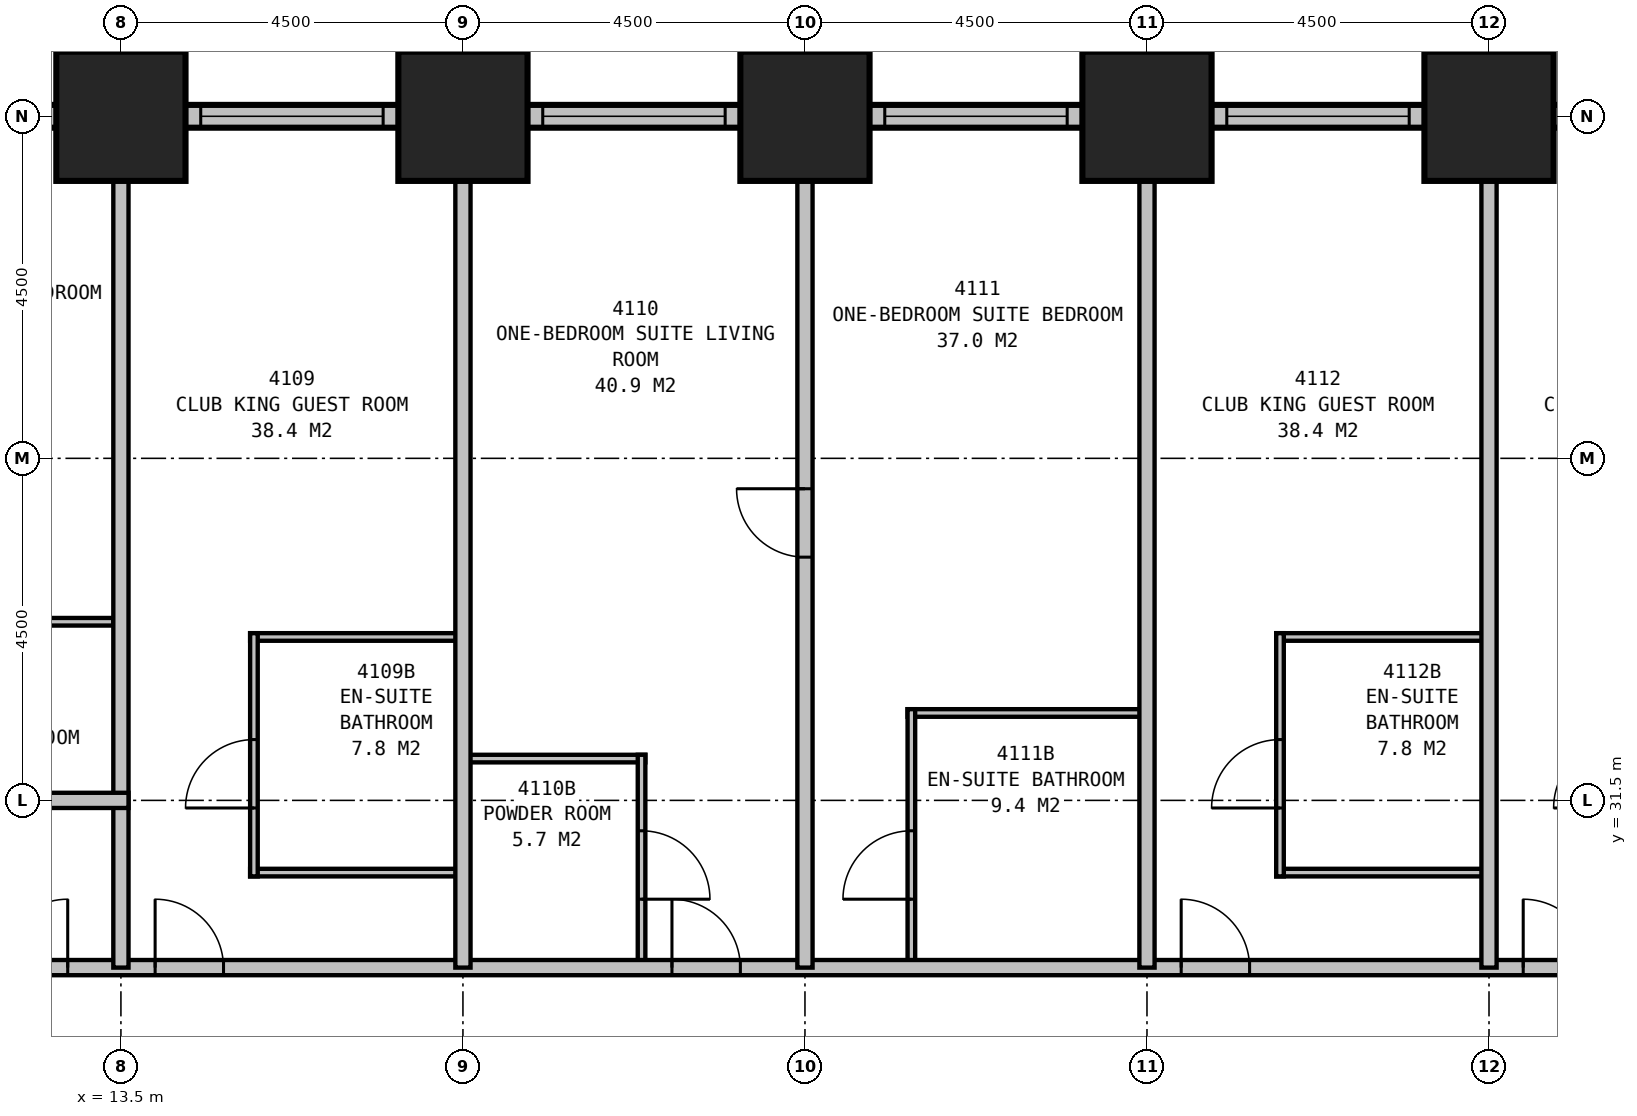
"""IFC4 building model, lengths in metres.
Left out: names, types, materials, properties, quantities, classifications, styles, units other than length and angle.
Written with IfcOpenShell. Run it as: python <this file> out.ifc"""

import sys

from ifc_helpers import new_model, si_unit, direction, frame, frame_2d, origin, origin_2d, place, context, subcontext, project, spatial, rectangle, extrude, element, fill, save


model = new_model("IFC4")
c1 = context("Model", 3, precision=1e-05, world=origin(), true_north=direction((0.0, 1.0)))
c2 = subcontext(c1, "Body", "Model", "MODEL_VIEW")
j1 = project(units=[si_unit("LENGTHUNIT", "METRE"), si_unit("PLANEANGLEUNIT", "RADIAN")], contexts=[c1])
p1 = place(None, origin())
s1 = spatial("IfcSite", under=j1, at=p1, CompositionType="ELEMENT")
p2 = place(p1, origin())
s2 = spatial("IfcBuilding", under=s1, at=p2, CompositionType="ELEMENT")
p3 = place(p2, frame((0.0, 0.0, 162.4)))
s3 = spatial("IfcBuildingStorey", under=s2, at=p3, CompositionType="ELEMENT", Elevation=162.4)
for number, where, z_axis, x_axis in (
    (1, (31.5, 40.5, 0.0), (0.0, 0.0, 1.0), (1.0, 0.0, 0.0)),
    (2, (27.0, 40.5, 0.0), (0.0, 0.0, 1.0), (1.0, 0.0, 0.0)),
    (3, (22.5, 40.5, 0.0), (0.0, 0.0, 1.0), (1.0, 0.0, 0.0)),
    (4, (18.0, 40.5, 0.0), (0.0, 0.0, 1.0), (1.0, 0.0, 0.0)),
    (5, (13.5, 40.5, 0.0), (0.0, 0.0, 1.0), (1.0, 0.0, 0.0)),
):
    element("IfcColumn", number, at=place(p3, frame(where, z_axis=z_axis, x_axis=x_axis)), inside=s3, PredefinedType="COLUMN", context=c2, shape_type="SweptSolid", body=[
        extrude(rectangle(XDim=1.7, YDim=1.7, at=origin_2d()), origin(), (0.0, 0.0, 1.0), 3.5),
    ])
p4 = place(p3, frame((40.65, 40.5, 0.0), z_axis=(0.0, 0.0, 1.0), x_axis=(-1.0, 0.0, 0.0)))
e6 = element("IfcWall", 6, at=p4, inside=s3, PredefinedType="STANDARD", context=c2, shape_type="SweptSolid", body=[
    extrude(rectangle(XDim=31.8, YDim=0.3, at=frame_2d((15.9, 0.0))), origin(), (0.0, 0.0, 1.0), 2.25),
])
p5 = place(p4, frame((1.2, 0.0, 0.5)))
e7 = element("IfcOpeningElement", 7, at=p5, cuts=e6, PredefinedType="OPENING", context=c2, shape_type="SweptSolid", body=[
    extrude(rectangle(XDim=2.4, YDim=1.6, at=frame_2d((1.2, 0.8))), frame((0.0, 0.16, 0.0), z_axis=(0.0, -1.0, 0.0), x_axis=(1.0, 0.0, 0.0)), (0.0, 0.0, 1.0), 0.32),
])
p6 = place(p4, frame((5.7, 0.0, 0.5)))
e8 = element("IfcOpeningElement", 8, at=p6, cuts=e6, PredefinedType="OPENING", context=c2, shape_type="SweptSolid", body=[
    extrude(rectangle(XDim=2.4, YDim=1.6, at=frame_2d((1.2, 0.8))), frame((0.0, 0.16, 0.0), z_axis=(0.0, -1.0, 0.0), x_axis=(1.0, 0.0, 0.0)), (0.0, 0.0, 1.0), 0.32),
])
p7 = place(p4, frame((10.2, 0.0, 0.5)))
e9 = element("IfcOpeningElement", 9, at=p7, cuts=e6, PredefinedType="OPENING", context=c2, shape_type="SweptSolid", body=[
    extrude(rectangle(XDim=2.4, YDim=1.6, at=frame_2d((1.2, 0.8))), frame((0.0, 0.16, 0.0), z_axis=(0.0, -1.0, 0.0), x_axis=(1.0, 0.0, 0.0)), (0.0, 0.0, 1.0), 0.32),
])
p8 = place(p4, frame((14.7, 0.0, 0.5)))
e10 = element("IfcOpeningElement", 10, at=p8, cuts=e6, PredefinedType="OPENING", context=c2, shape_type="SweptSolid", body=[
    extrude(rectangle(XDim=2.4, YDim=1.6, at=frame_2d((1.2, 0.8))), frame((0.0, 0.16, 0.0), z_axis=(0.0, -1.0, 0.0), x_axis=(1.0, 0.0, 0.0)), (0.0, 0.0, 1.0), 0.32),
])
p9 = place(p4, frame((19.2, 0.0, 0.5)))
e11 = element("IfcOpeningElement", 11, at=p9, cuts=e6, PredefinedType="OPENING", context=c2, shape_type="SweptSolid", body=[
    extrude(rectangle(XDim=2.4, YDim=1.6, at=frame_2d((1.2, 0.8))), frame((0.0, 0.16, 0.0), z_axis=(0.0, -1.0, 0.0), x_axis=(1.0, 0.0, 0.0)), (0.0, 0.0, 1.0), 0.32),
])
p10 = place(p4, frame((23.7, 0.0, 0.5)))
e12 = element("IfcOpeningElement", 12, at=p10, cuts=e6, PredefinedType="OPENING", context=c2, shape_type="SweptSolid", body=[
    extrude(rectangle(XDim=2.4, YDim=1.6, at=frame_2d((1.2, 0.8))), frame((0.0, 0.16, 0.0), z_axis=(0.0, -1.0, 0.0), x_axis=(1.0, 0.0, 0.0)), (0.0, 0.0, 1.0), 0.32),
])
p11 = place(p4, frame((28.2, 0.0, 0.5)))
e13 = element("IfcOpeningElement", 13, at=p11, cuts=e6, PredefinedType="OPENING", context=c2, shape_type="SweptSolid", body=[
    extrude(rectangle(XDim=2.4, YDim=1.6, at=frame_2d((1.2, 0.8))), frame((0.0, 0.16, 0.0), z_axis=(0.0, -1.0, 0.0), x_axis=(1.0, 0.0, 0.0)), (0.0, 0.0, 1.0), 0.32),
])
p12 = place(p3, frame((11.2, 29.3, 0.0), z_axis=(0.0, 0.0, 1.0), x_axis=(1.0, 0.0, 0.0)))
e14 = element("IfcWall", 14, at=p12, inside=s3, PredefinedType="PARTITIONING", context=c2, shape_type="SweptSolid", body=[
    extrude(rectangle(XDim=27.1, YDim=0.2, at=frame_2d((13.55, 0.0))), origin(), (0.0, 0.0, 1.0), 3.25),
])
p13 = place(p12, frame((2.75, 0.0, 0.0)))
e15 = element("IfcOpeningElement", 15, at=p13, cuts=e14, PredefinedType="OPENING", context=c2, shape_type="SweptSolid", body=[
    extrude(rectangle(XDim=0.9, YDim=2.1, at=frame_2d((0.45, 1.05))), frame((0.0, 0.11, 0.0), z_axis=(0.0, -1.0, 0.0), x_axis=(1.0, 0.0, 0.0)), (0.0, 0.0, 1.0), 0.22),
])
p14 = place(p12, frame((9.55, 0.0, 0.0)))
e16 = element("IfcOpeningElement", 16, at=p14, cuts=e14, PredefinedType="OPENING", context=c2, shape_type="SweptSolid", body=[
    extrude(rectangle(XDim=0.9, YDim=2.1, at=frame_2d((0.45, 1.05))), frame((0.0, 0.11, 0.0), z_axis=(0.0, -1.0, 0.0), x_axis=(1.0, 0.0, 0.0)), (0.0, 0.0, 1.0), 0.22),
])
p15 = place(p12, frame((16.25, 0.0, 0.0)))
e17 = element("IfcOpeningElement", 17, at=p15, cuts=e14, PredefinedType="OPENING", context=c2, shape_type="SweptSolid", body=[
    extrude(rectangle(XDim=0.9, YDim=2.1, at=frame_2d((0.45, 1.05))), frame((0.0, 0.11, 0.0), z_axis=(0.0, -1.0, 0.0), x_axis=(1.0, 0.0, 0.0)), (0.0, 0.0, 1.0), 0.22),
])
p16 = place(p12, frame((20.75, 0.0, 0.0)))
e18 = element("IfcOpeningElement", 18, at=p16, cuts=e14, PredefinedType="OPENING", context=c2, shape_type="SweptSolid", body=[
    extrude(rectangle(XDim=0.9, YDim=2.1, at=frame_2d((0.45, 1.05))), frame((0.0, 0.11, 0.0), z_axis=(0.0, -1.0, 0.0), x_axis=(1.0, 0.0, 0.0)), (0.0, 0.0, 1.0), 0.22),
])
p17 = place(p12, frame((25.5, 0.0, 0.0)))
e19 = element("IfcOpeningElement", 19, at=p17, cuts=e14, PredefinedType="OPENING", context=c2, shape_type="SweptSolid", body=[
    extrude(rectangle(XDim=0.9, YDim=2.1, at=frame_2d((0.45, 1.05))), frame((0.0, 0.11, 0.0), z_axis=(0.0, -1.0, 0.0), x_axis=(1.0, 0.0, 0.0)), (0.0, 0.0, 1.0), 0.22),
])
p18 = place(p12, frame((0.7, 0.0, 0.0)))
e20 = element("IfcOpeningElement", 20, at=p18, cuts=e14, PredefinedType="OPENING", context=c2, shape_type="SweptSolid", body=[
    extrude(rectangle(XDim=0.9, YDim=2.1, at=frame_2d((0.45, 1.05))), frame((0.0, 0.11, 0.0), z_axis=(0.0, -1.0, 0.0), x_axis=(1.0, 0.0, 0.0)), (0.0, 0.0, 1.0), 0.22),
])
p19 = place(p3, frame((18.0, 29.3, 0.0), z_axis=(0.0, 0.0, 1.0), x_axis=(0.0, 1.0, 0.0)))
e21 = element("IfcWall", 21, at=p19, inside=s3, PredefinedType="PARTITIONING", context=c2, shape_type="SweptSolid", body=[
    extrude(rectangle(XDim=11.2, YDim=0.2, at=frame_2d((5.6, 0.0))), origin(), (0.0, 0.0, 1.0), 2.25),
])
p20 = place(p3, frame((22.5, 29.3, 0.0), z_axis=(0.0, 0.0, 1.0), x_axis=(0.0, 1.0, 0.0)))
e22 = element("IfcWall", 22, at=p20, inside=s3, PredefinedType="PARTITIONING", context=c2, shape_type="SweptSolid", body=[
    extrude(rectangle(XDim=11.2, YDim=0.2, at=frame_2d((5.6, 0.0))), origin(), (0.0, 0.0, 1.0), 2.25),
])
p21 = place(p20, frame((5.4, 0.0, 0.0)))
e23 = element("IfcOpeningElement", 23, at=p21, cuts=e22, PredefinedType="OPENING", context=c2, shape_type="SweptSolid", body=[
    extrude(rectangle(XDim=0.9, YDim=2.1, at=frame_2d((0.45, 1.05))), frame((0.0, 0.11, 0.0), z_axis=(0.0, -1.0, 0.0), x_axis=(1.0, 0.0, 0.0)), (0.0, 0.0, 1.0), 0.22),
])
for number, where, z_axis, x_axis in (
    (24, (27.0, 29.3, 0.0), (0.0, 0.0, 1.0), (0.0, 1.0, 0.0)),
    (25, (31.5, 29.3, 0.0), (0.0, 0.0, 1.0), (0.0, 1.0, 0.0)),
):
    element("IfcWall", number, at=place(p3, frame(where, z_axis=z_axis, x_axis=x_axis)), inside=s3, PredefinedType="PARTITIONING", context=c2, shape_type="SweptSolid", body=[
        extrude(rectangle(XDim=11.2, YDim=0.2, at=frame_2d((5.6, 0.0))), origin(), (0.0, 0.0, 1.0), 2.25),
    ])
for number, where, z_axis, x_axis in (
    (26, (15.2, 30.55, 0.0), (0.0, 0.0, 1.0), (1.0, 0.0, 0.0)),
    (27, (15.2, 33.65, 0.0), (0.0, 0.0, 1.0), (1.0, 0.0, 0.0)),
):
    element("IfcWall", number, at=place(p3, frame(where, z_axis=z_axis, x_axis=x_axis)), inside=s3, PredefinedType="PLUMBINGWALL", context=c2, shape_type="SweptSolid", body=[
        extrude(rectangle(XDim=2.8, YDim=0.1, at=frame_2d((1.4, 0.0))), origin(), (0.0, 0.0, 1.0), 3.25),
    ])
p22 = place(p3, frame((15.25, 30.5, 0.0), z_axis=(0.0, 0.0, 1.0), x_axis=(0.0, 1.0, 0.0)))
e28 = element("IfcWall", 28, at=p22, inside=s3, PredefinedType="PLUMBINGWALL", context=c2, shape_type="SweptSolid", body=[
    extrude(rectangle(XDim=3.2, YDim=0.1, at=frame_2d((1.6, 0.0))), origin(), (0.0, 0.0, 1.0), 3.25),
])
p23 = place(p22, frame((0.9, 0.0, 0.0)))
e29 = element("IfcOpeningElement", 29, at=p23, cuts=e28, PredefinedType="OPENING", context=c2, shape_type="SweptSolid", body=[
    extrude(rectangle(XDim=0.9, YDim=2.1, at=frame_2d((0.45, 1.05))), frame((0.0, 0.06, 0.0), z_axis=(0.0, -1.0, 0.0), x_axis=(1.0, 0.0, 0.0)), (0.0, 0.0, 1.0), 0.12),
])
p24 = place(p3, frame((18.0, 32.05, 0.0), z_axis=(0.0, 0.0, 1.0), x_axis=(1.0, 0.0, 0.0)))
e30 = element("IfcWall", 30, at=p24, inside=s3, PredefinedType="PLUMBINGWALL", context=c2, shape_type="SweptSolid", body=[
    extrude(rectangle(XDim=2.4, YDim=0.1, at=frame_2d((1.2, 0.0))), origin(), (0.0, 0.0, 1.0), 3.25),
])
p25 = place(p3, frame((20.35, 29.3, 0.0), z_axis=(0.0, 0.0, 1.0), x_axis=(0.0, 1.0, 0.0)))
e31 = element("IfcWall", 31, at=p25, inside=s3, PredefinedType="PLUMBINGWALL", context=c2, shape_type="SweptSolid", body=[
    extrude(rectangle(XDim=2.8, YDim=0.1, at=frame_2d((1.4, 0.0))), origin(), (0.0, 0.0, 1.0), 3.25),
])
p26 = place(p25, frame((1.8, 0.0, 0.0), z_axis=(0.0, 0.0, 1.0), x_axis=(-1.0, 0.0, 0.0)))
e32 = element("IfcOpeningElement", 32, at=p26, cuts=e31, PredefinedType="OPENING", context=c2, shape_type="SweptSolid", body=[
    extrude(rectangle(XDim=0.9, YDim=2.1, at=frame_2d((0.45, 1.05))), frame((0.0, 0.06, 0.0), z_axis=(0.0, -1.0, 0.0), x_axis=(1.0, 0.0, 0.0)), (0.0, 0.0, 1.0), 0.12),
])
p27 = place(p3, frame((23.85, 32.65, 0.0), z_axis=(0.0, 0.0, 1.0), x_axis=(1.0, 0.0, 0.0)))
e33 = element("IfcWall", 33, at=p27, inside=s3, PredefinedType="PLUMBINGWALL", context=c2, shape_type="SweptSolid", body=[
    extrude(rectangle(XDim=3.15, YDim=0.1, at=frame_2d((1.575, 0.0))), origin(), (0.0, 0.0, 1.0), 3.25),
])
p28 = place(p3, frame((23.9, 29.3, 0.0), z_axis=(0.0, 0.0, 1.0), x_axis=(0.0, 1.0, 0.0)))
e34 = element("IfcWall", 34, at=p28, inside=s3, PredefinedType="PLUMBINGWALL", context=c2, shape_type="SweptSolid", body=[
    extrude(rectangle(XDim=3.4, YDim=0.1, at=frame_2d((1.7, 0.0))), origin(), (0.0, 0.0, 1.0), 3.25),
])
p29 = place(p28, frame((0.9, 0.0, 0.0)))
e35 = element("IfcOpeningElement", 35, at=p29, cuts=e34, PredefinedType="OPENING", context=c2, shape_type="SweptSolid", body=[
    extrude(rectangle(XDim=0.9, YDim=2.1, at=frame_2d((0.45, 1.05))), frame((0.0, 0.06, 0.0), z_axis=(0.0, -1.0, 0.0), x_axis=(1.0, 0.0, 0.0)), (0.0, 0.0, 1.0), 0.12),
])
for number, where, z_axis, x_axis in (
    (36, (28.7, 30.55, 0.0), (0.0, 0.0, 1.0), (1.0, 0.0, 0.0)),
    (37, (28.7, 33.65, 0.0), (0.0, 0.0, 1.0), (1.0, 0.0, 0.0)),
):
    element("IfcWall", number, at=place(p3, frame(where, z_axis=z_axis, x_axis=x_axis)), inside=s3, PredefinedType="PLUMBINGWALL", context=c2, shape_type="SweptSolid", body=[
        extrude(rectangle(XDim=2.8, YDim=0.1, at=frame_2d((1.4, 0.0))), origin(), (0.0, 0.0, 1.0), 3.25),
    ])
p30 = place(p3, frame((28.75, 30.5, 0.0), z_axis=(0.0, 0.0, 1.0), x_axis=(0.0, 1.0, 0.0)))
e38 = element("IfcWall", 38, at=p30, inside=s3, PredefinedType="PLUMBINGWALL", context=c2, shape_type="SweptSolid", body=[
    extrude(rectangle(XDim=3.2, YDim=0.1, at=frame_2d((1.6, 0.0))), origin(), (0.0, 0.0, 1.0), 3.25),
])
p31 = place(p30, frame((0.9, 0.0, 0.0)))
e39 = element("IfcOpeningElement", 39, at=p31, cuts=e38, PredefinedType="OPENING", context=c2, shape_type="SweptSolid", body=[
    extrude(rectangle(XDim=0.9, YDim=2.1, at=frame_2d((0.45, 1.05))), frame((0.0, 0.06, 0.0), z_axis=(0.0, -1.0, 0.0), x_axis=(1.0, 0.0, 0.0)), (0.0, 0.0, 1.0), 0.12),
])
p32 = place(p3, frame((13.5, 29.3, 0.0), z_axis=(0.0, 0.0, 1.0), x_axis=(0.0, 1.0, 0.0)))
e40 = element("IfcWall", 40, at=p32, inside=s3, PredefinedType="PARTITIONING", context=c2, shape_type="SweptSolid", body=[
    extrude(rectangle(XDim=11.2, YDim=0.2, at=frame_2d((5.6, 0.0))), origin(), (0.0, 0.0, 1.0), 2.25),
])
p33 = place(p3, frame((13.6, 31.5, 0.0), z_axis=(0.0, 0.0, 1.0), x_axis=(-1.0, 0.0, 0.0)))
e41 = element("IfcWall", 41, at=p33, inside=s3, PredefinedType="PARTITIONING", context=c2, shape_type="SweptSolid", body=[
    extrude(rectangle(XDim=10.099, YDim=0.2, at=frame_2d((5.05, 0.0))), origin(), (0.0, 0.0, 1.0), 3.25),
])
p34 = place(p33, frame((8.999, 0.0, 0.0), z_axis=(0.0, 0.0, 1.0), x_axis=(-1.0, 0.0, 0.0)))
e42 = element("IfcOpeningElement", 42, at=p34, cuts=e41, PredefinedType="OPENING", context=c2, shape_type="SweptSolid", body=[
    extrude(rectangle(XDim=0.9, YDim=2.1, at=frame_2d((0.45, 1.05))), frame((0.0, 0.11, 0.0), z_axis=(0.0, -1.0, 0.0), x_axis=(1.0, 0.0, 0.0)), (0.0, 0.0, 1.0), 0.22),
])
p35 = place(p3, frame((13.4, 33.85, 0.0), z_axis=(0.0, 0.0, 1.0), x_axis=(-1.0, 0.0, 0.0)))
e43 = element("IfcWall", 43, at=p35, inside=s3, PredefinedType="PLUMBINGWALL", context=c2, shape_type="SweptSolid", body=[
    extrude(rectangle(XDim=3.3, YDim=0.1, at=frame_2d((1.65, 0.0))), origin(), (0.0, 0.0, 1.0), 3.25),
])
p36 = place(p35, frame((1.8, 0.0, 0.0), z_axis=(0.0, 0.0, 1.0), x_axis=(-1.0, 0.0, 0.0)))
e44 = element("IfcOpeningElement", 44, at=p36, cuts=e43, PredefinedType="OPENING", context=c2, shape_type="SweptSolid", body=[
    extrude(rectangle(XDim=0.9, YDim=2.1, at=frame_2d((0.45, 1.05))), frame((0.0, 0.06, 0.0), z_axis=(0.0, -1.0, 0.0), x_axis=(1.0, 0.0, 0.0)), (0.0, 0.0, 1.0), 0.12),
])
p37 = place(p7, origin())
e45 = element("IfcWindow", 45, at=p37, inside=s3, PartitioningType="SINGLE_PANEL", PredefinedType="WINDOW", context=c2, shape_type="SweptSolid", body=[
    extrude(rectangle(XDim=2.4, YDim=1.6, at=frame_2d((1.2, 0.8))), frame((0.0, 0.03, 0.0), z_axis=(0.0, -1.0, 0.0), x_axis=(1.0, 0.0, 0.0)), (0.0, 0.0, 1.0), 0.06),
])
fill(e9, e45)
p38 = place(p8, origin())
e46 = element("IfcWindow", 46, at=p38, inside=s3, PartitioningType="SINGLE_PANEL", PredefinedType="WINDOW", context=c2, shape_type="SweptSolid", body=[
    extrude(rectangle(XDim=2.4, YDim=1.6, at=frame_2d((1.2, 0.8))), frame((0.0, 0.03, 0.0), z_axis=(0.0, -1.0, 0.0), x_axis=(1.0, 0.0, 0.0)), (0.0, 0.0, 1.0), 0.06),
])
fill(e10, e46)
p39 = place(p9, origin())
e47 = element("IfcWindow", 47, at=p39, inside=s3, PartitioningType="SINGLE_PANEL", PredefinedType="WINDOW", context=c2, shape_type="SweptSolid", body=[
    extrude(rectangle(XDim=2.4, YDim=1.6, at=frame_2d((1.2, 0.8))), frame((0.0, 0.03, 0.0), z_axis=(0.0, -1.0, 0.0), x_axis=(1.0, 0.0, 0.0)), (0.0, 0.0, 1.0), 0.06),
])
fill(e11, e47)
p40 = place(p10, origin())
e48 = element("IfcWindow", 48, at=p40, inside=s3, PartitioningType="SINGLE_PANEL", PredefinedType="WINDOW", context=c2, shape_type="SweptSolid", body=[
    extrude(rectangle(XDim=2.4, YDim=1.6, at=frame_2d((1.2, 0.8))), frame((0.0, 0.03, 0.0), z_axis=(0.0, -1.0, 0.0), x_axis=(1.0, 0.0, 0.0)), (0.0, 0.0, 1.0), 0.06),
])
fill(e12, e48)
p41 = place(p13, origin())
e49 = element("IfcDoor", 49, at=p41, inside=s3, OperationType="SINGLE_SWING_LEFT", PredefinedType="DOOR", context=c2, shape_type="SweptSolid", body=[
    extrude(rectangle(XDim=0.9, YDim=2.1, at=frame_2d((0.45, 1.05))), frame((0.0, 0.025, 0.0), z_axis=(0.0, -1.0, 0.0), x_axis=(1.0, 0.0, 0.0)), (0.0, 0.0, 1.0), 0.05),
])
fill(e15, e49)
p42 = place(p14, origin())
e50 = element("IfcDoor", 50, at=p42, inside=s3, OperationType="SINGLE_SWING_LEFT", PredefinedType="DOOR", context=c2, shape_type="SweptSolid", body=[
    extrude(rectangle(XDim=0.9, YDim=2.1, at=frame_2d((0.45, 1.05))), frame((0.0, 0.025, 0.0), z_axis=(0.0, -1.0, 0.0), x_axis=(1.0, 0.0, 0.0)), (0.0, 0.0, 1.0), 0.05),
])
fill(e16, e50)
p43 = place(p15, origin())
e51 = element("IfcDoor", 51, at=p43, inside=s3, OperationType="SINGLE_SWING_LEFT", PredefinedType="DOOR", context=c2, shape_type="SweptSolid", body=[
    extrude(rectangle(XDim=0.9, YDim=2.1, at=frame_2d((0.45, 1.05))), frame((0.0, 0.025, 0.0), z_axis=(0.0, -1.0, 0.0), x_axis=(1.0, 0.0, 0.0)), (0.0, 0.0, 1.0), 0.05),
])
fill(e17, e51)
p44 = place(p16, origin())
e52 = element("IfcDoor", 52, at=p44, inside=s3, OperationType="SINGLE_SWING_LEFT", PredefinedType="DOOR", context=c2, shape_type="SweptSolid", body=[
    extrude(rectangle(XDim=0.9, YDim=2.1, at=frame_2d((0.45, 1.05))), frame((0.0, 0.025, 0.0), z_axis=(0.0, -1.0, 0.0), x_axis=(1.0, 0.0, 0.0)), (0.0, 0.0, 1.0), 0.05),
])
fill(e18, e52)
p45 = place(p18, origin())
e53 = element("IfcDoor", 53, at=p45, inside=s3, OperationType="SINGLE_SWING_RIGHT", PredefinedType="DOOR", context=c2, shape_type="SweptSolid", body=[
    extrude(rectangle(XDim=0.9, YDim=2.1, at=frame_2d((0.45, 1.05))), frame((0.0, 0.025, 0.0), z_axis=(0.0, -1.0, 0.0), x_axis=(1.0, 0.0, 0.0)), (0.0, 0.0, 1.0), 0.05),
])
fill(e20, e53)
p46 = place(p21, origin())
e54 = element("IfcDoor", 54, at=p46, inside=s3, OperationType="SINGLE_SWING_RIGHT", PredefinedType="DOOR", context=c2, shape_type="SweptSolid", body=[
    extrude(rectangle(XDim=0.9, YDim=2.1, at=frame_2d((0.45, 1.05))), frame((0.0, 0.025, 0.0), z_axis=(0.0, -1.0, 0.0), x_axis=(1.0, 0.0, 0.0)), (0.0, 0.0, 1.0), 0.05),
])
fill(e23, e54)
p47 = place(p23, origin())
e55 = element("IfcDoor", 55, at=p47, inside=s3, OperationType="SINGLE_SWING_LEFT", PredefinedType="DOOR", context=c2, shape_type="SweptSolid", body=[
    extrude(rectangle(XDim=0.9, YDim=2.1, at=frame_2d((0.45, 1.05))), frame((0.0, 0.025, 0.0), z_axis=(0.0, -1.0, 0.0), x_axis=(1.0, 0.0, 0.0)), (0.0, 0.0, 1.0), 0.05),
])
fill(e29, e55)
p48 = place(p26, origin())
e56 = element("IfcDoor", 56, at=p48, inside=s3, OperationType="SINGLE_SWING_RIGHT", PredefinedType="DOOR", context=c2, shape_type="SweptSolid", body=[
    extrude(rectangle(XDim=0.9, YDim=2.1, at=frame_2d((0.45, 1.05))), frame((0.0, 0.025, 0.0), z_axis=(0.0, -1.0, 0.0), x_axis=(1.0, 0.0, 0.0)), (0.0, 0.0, 1.0), 0.05),
])
fill(e32, e56)
p49 = place(p29, origin())
e57 = element("IfcDoor", 57, at=p49, inside=s3, OperationType="SINGLE_SWING_LEFT", PredefinedType="DOOR", context=c2, shape_type="SweptSolid", body=[
    extrude(rectangle(XDim=0.9, YDim=2.1, at=frame_2d((0.45, 1.05))), frame((0.0, 0.025, 0.0), z_axis=(0.0, -1.0, 0.0), x_axis=(1.0, 0.0, 0.0)), (0.0, 0.0, 1.0), 0.05),
])
fill(e35, e57)
p50 = place(p31, origin())
e58 = element("IfcDoor", 58, at=p50, inside=s3, OperationType="SINGLE_SWING_LEFT", PredefinedType="DOOR", context=c2, shape_type="SweptSolid", body=[
    extrude(rectangle(XDim=0.9, YDim=2.1, at=frame_2d((0.45, 1.05))), frame((0.0, 0.025, 0.0), z_axis=(0.0, -1.0, 0.0), x_axis=(1.0, 0.0, 0.0)), (0.0, 0.0, 1.0), 0.05),
])
fill(e39, e58)
save(model, sys.argv[1])
